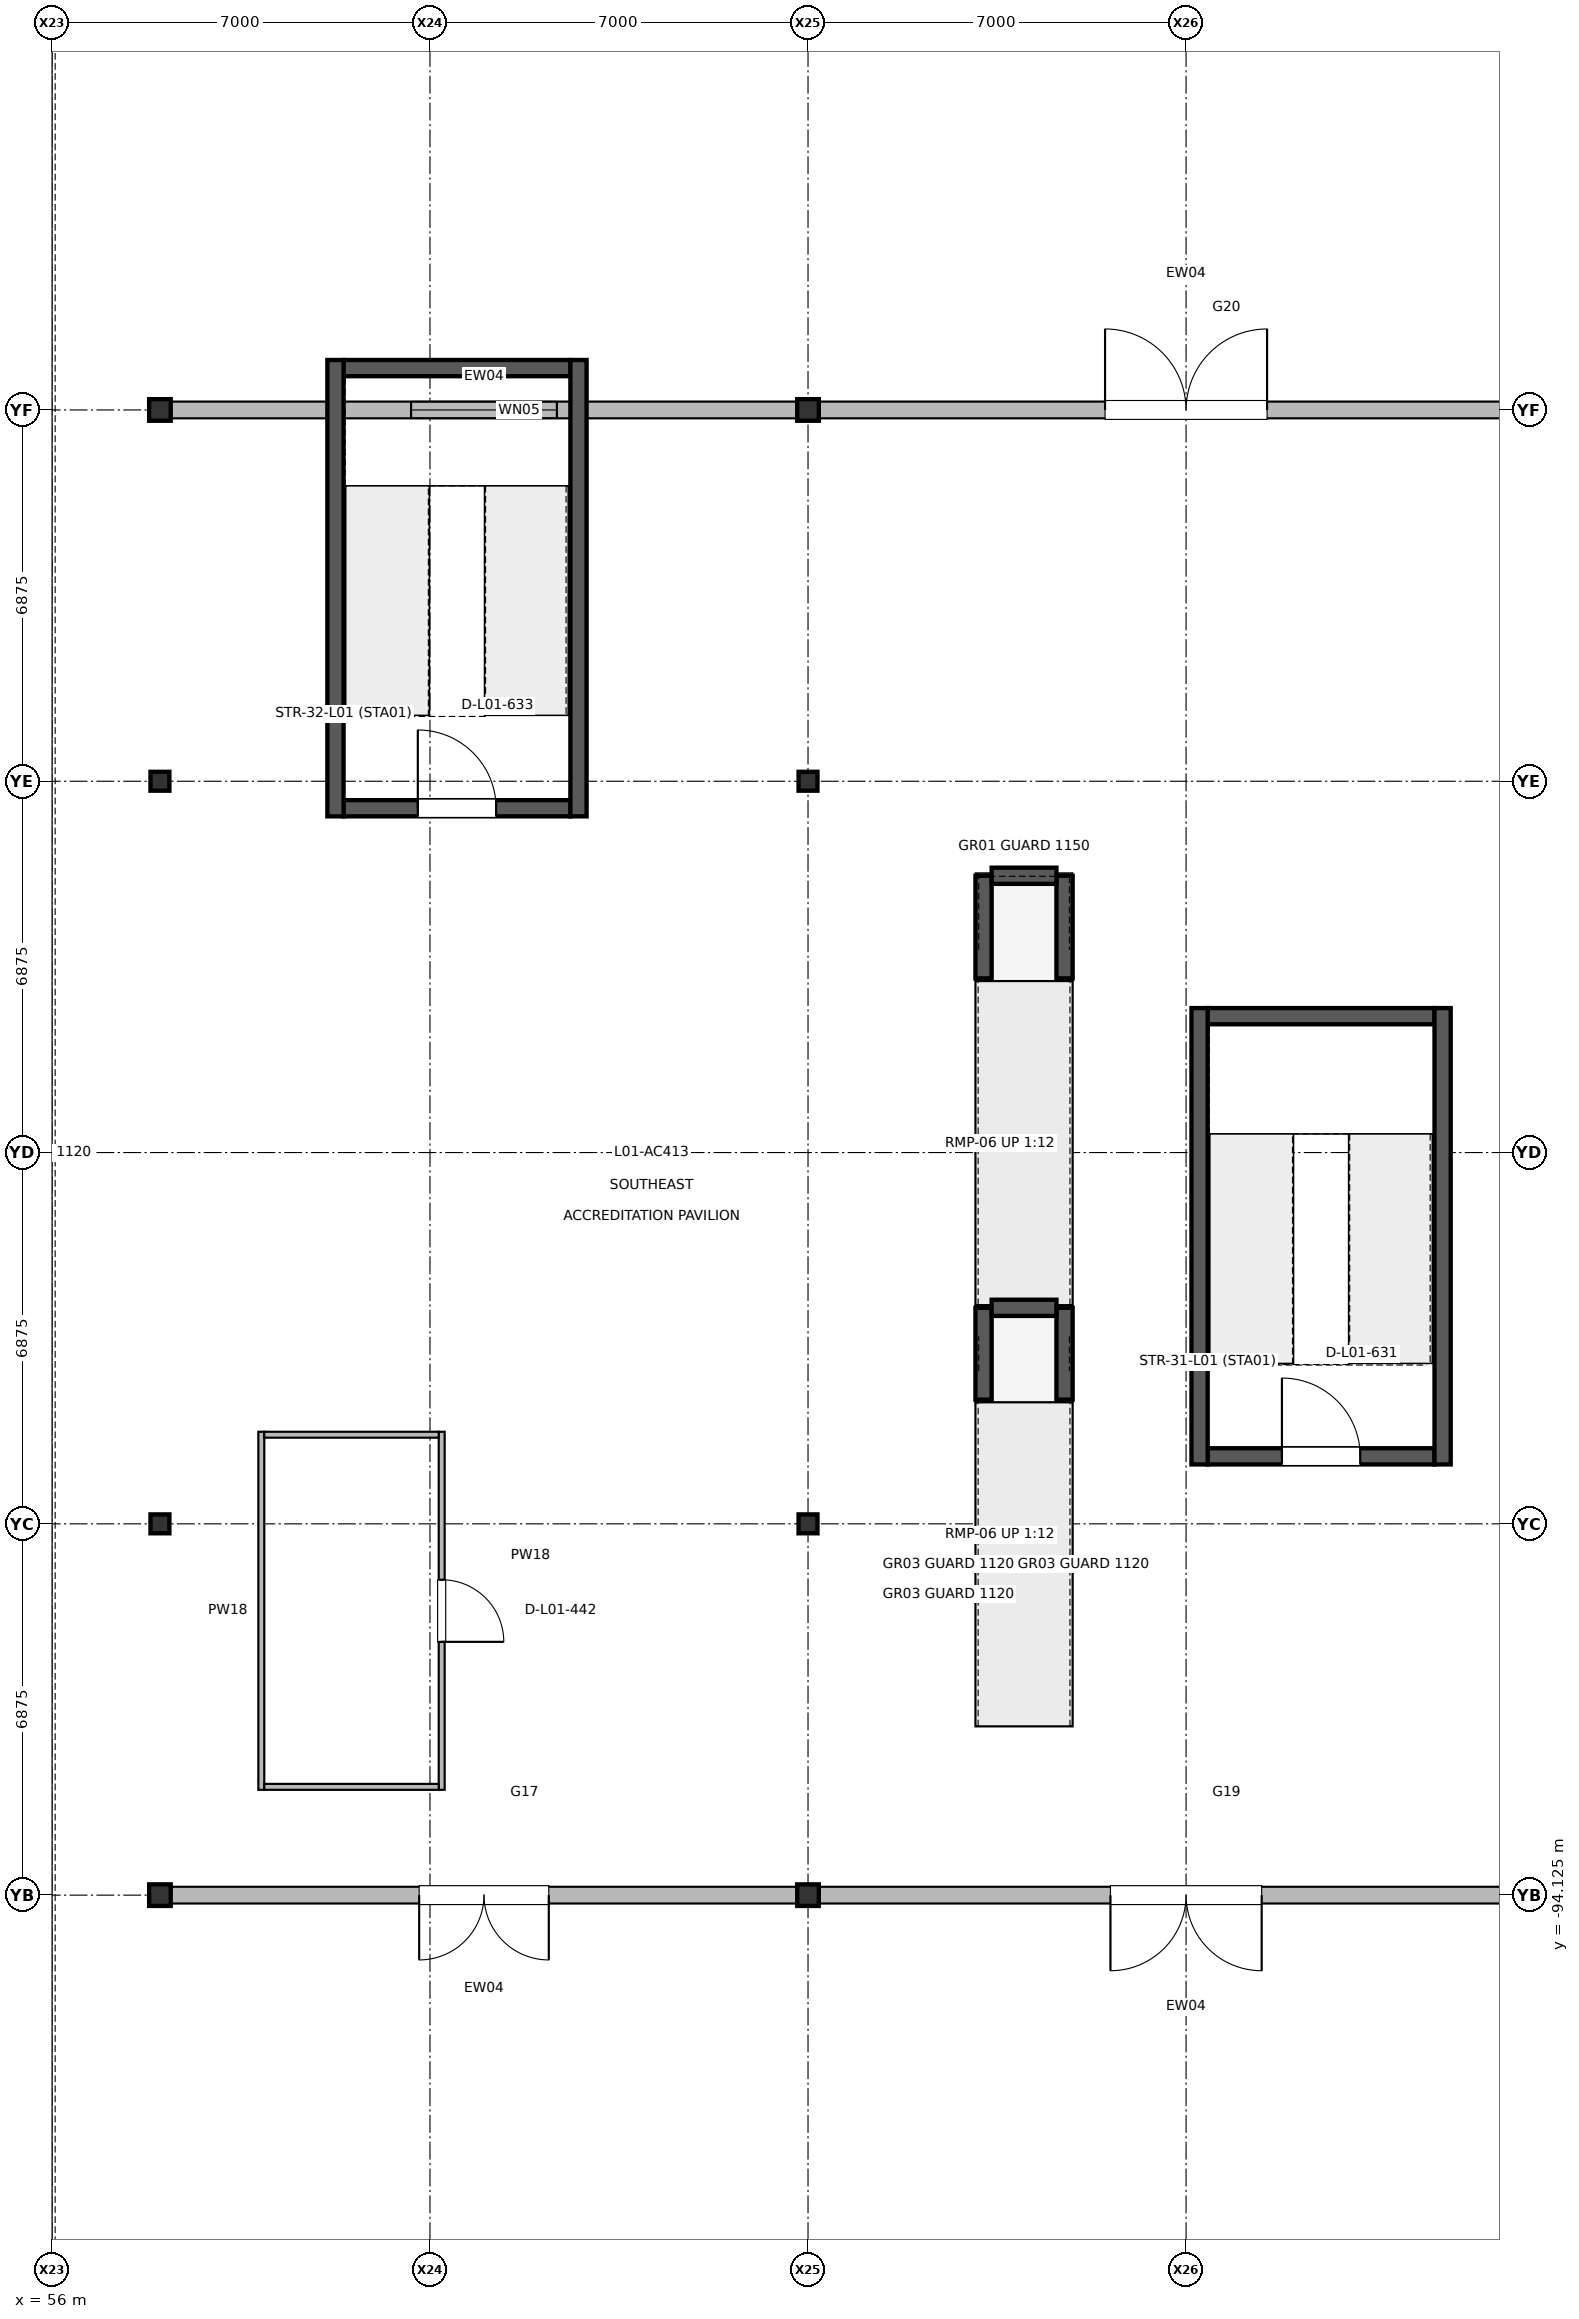
"""IFC4 building model, lengths in metres.
Left out: names, types, materials, properties, quantities, classifications, styles, units other than length and angle.
Written with IfcOpenShell. Run it as: python <this file> out.ifc"""

import sys

from ifc_helpers import new_model, si_unit, direction, frame, frame_2d, origin, origin_2d, place, context, subcontext, project, spatial, rectangle, i_section, extrude, element, fill, save


model = new_model("IFC4")
c1 = context("Model", 3, precision=1e-05, world=origin(), true_north=direction((0.0, 1.0)))
c2 = subcontext(c1, "Body", "Model", "MODEL_VIEW")
j1 = project(units=[si_unit("LENGTHUNIT", "METRE"), si_unit("PLANEANGLEUNIT", "RADIAN")], contexts=[c1])
p1 = place(None, origin())
s1 = spatial("IfcSite", under=j1, at=p1, CompositionType="ELEMENT")
p2 = place(p1, origin())
s2 = spatial("IfcBuilding", under=s1, at=p2, CompositionType="ELEMENT")
p3 = place(p2, origin())
s3 = spatial("IfcBuildingStorey", under=s2, at=p3, CompositionType="ELEMENT", Elevation=0.0)
p4 = place(p3, frame((58.0, -94.125, 0.0), z_axis=(0.0, 0.0, 1.0), x_axis=(1.0, 0.0, 0.0)))
e1 = element("IfcColumn", 1, at=p4, inside=s3, PredefinedType="COLUMN", context=c2, shape_type="SweptSolid", body=[
    extrude(i_section(OverallWidth=0.4, OverallDepth=0.4, WebThickness=0.013, FlangeThickness=0.021, at=origin_2d()), origin(), (0.0, 0.0, 1.0), 5.998),
])
for number, where, z_axis, x_axis in (
    (2, (58.0, -87.25, 0.0), (0.0, 0.0, 1.0), (1.0, 0.0, 0.0)),
    (3, (58.0, -73.5, 0.0), (0.0, 0.0, 1.0), (1.0, 0.0, 0.0)),
):
    element("IfcColumn", number, at=place(p3, frame(where, z_axis=z_axis, x_axis=x_axis)), inside=s3, PredefinedType="COLUMN", context=c2, shape_type="SweptSolid", body=[
        extrude(i_section(OverallWidth=0.35, OverallDepth=0.35, WebThickness=0.012, FlangeThickness=0.019, at=origin_2d()), origin(), (0.0, 0.0, 1.0), 5.998),
    ])
for number, where, z_axis, x_axis in (
    (4, (58.0, -66.625, 0.0), (0.0, 0.0, 1.0), (1.0, 0.0, 0.0)),
    (5, (70.0, -94.125, 0.0), (0.0, 0.0, 1.0), (1.0, 0.0, 0.0)),
):
    element("IfcColumn", number, at=place(p3, frame(where, z_axis=z_axis, x_axis=x_axis)), inside=s3, PredefinedType="COLUMN", context=c2, shape_type="SweptSolid", body=[
        extrude(i_section(OverallWidth=0.4, OverallDepth=0.4, WebThickness=0.013, FlangeThickness=0.021, at=origin_2d()), origin(), (0.0, 0.0, 1.0), 5.998),
    ])
for number, where, z_axis, x_axis in (
    (6, (70.0, -87.25, 0.0), (0.0, 0.0, 1.0), (1.0, 0.0, 0.0)),
    (7, (70.0, -73.5, 0.0), (0.0, 0.0, 1.0), (1.0, 0.0, 0.0)),
):
    element("IfcColumn", number, at=place(p3, frame(where, z_axis=z_axis, x_axis=x_axis)), inside=s3, PredefinedType="COLUMN", context=c2, shape_type="SweptSolid", body=[
        extrude(i_section(OverallWidth=0.35, OverallDepth=0.35, WebThickness=0.012, FlangeThickness=0.019, at=origin_2d()), origin(), (0.0, 0.0, 1.0), 5.998),
    ])
p5 = place(p3, frame((70.0, -66.625, 0.0), z_axis=(0.0, 0.0, 1.0), x_axis=(1.0, 0.0, 0.0)))
e8 = element("IfcColumn", 8, at=p5, inside=s3, PredefinedType="COLUMN", context=c2, shape_type="SweptSolid", body=[
    extrude(i_section(OverallWidth=0.4, OverallDepth=0.4, WebThickness=0.013, FlangeThickness=0.021, at=origin_2d()), origin(), (0.0, 0.0, 1.0), 5.998),
])
p6 = place(p3, frame((69.81, -94.125, 0.0), z_axis=(0.0, 0.0, 1.0), x_axis=(-1.0, 0.0, 0.0)))
e9 = element("IfcWall", 9, at=p6, inside=s3, PredefinedType="SOLIDWALL", context=c2, shape_type="SweptSolid", body=[
    extrude(rectangle(XDim=11.62, YDim=0.31, at=frame_2d((5.81, 0.0))), origin(), (0.0, 0.0, 1.0), 4.575),
])
p7 = place(p6, frame((4.61, 0.0, 0.0)))
e10 = element("IfcOpeningElement", 10, at=p7, cuts=e9, PredefinedType="OPENING", context=c2, shape_type="SweptSolid", body=[
    extrude(rectangle(XDim=2.4, YDim=2.5, at=frame_2d((1.2, 1.25))), frame((0.0, 0.165, 0.0), z_axis=(0.0, -1.0, 0.0), x_axis=(1.0, 0.0, 0.0)), (0.0, 0.0, 1.0), 0.33),
])
p8 = place(p3, frame((58.19, -66.625, 0.0), z_axis=(0.0, 0.0, 1.0), x_axis=(1.0, 0.0, 0.0)))
e11 = element("IfcWall", 11, at=p8, inside=s3, PredefinedType="SOLIDWALL", context=c2, shape_type="SweptSolid", body=[
    extrude(rectangle(XDim=11.62, YDim=0.31, at=frame_2d((5.81, 0.0))), origin(), (0.0, 0.0, 1.0), 4.675),
])
p9 = place(p8, frame((4.46, 0.0, 1.0)))
e12 = element("IfcOpeningElement", 12, at=p9, cuts=e11, PredefinedType="OPENING", context=c2, shape_type="SweptSolid", body=[
    extrude(rectangle(XDim=2.7, YDim=2.1, at=frame_2d((1.35, 1.05))), frame((0.0, 0.165, 0.0), z_axis=(0.0, -1.0, 0.0), x_axis=(1.0, 0.0, 0.0)), (0.0, 0.0, 1.0), 0.33),
])
p10 = place(p3, frame((83.81, -94.125, 0.0), z_axis=(0.0, 0.0, 1.0), x_axis=(-1.0, 0.0, 0.0)))
e13 = element("IfcWall", 13, at=p10, inside=s3, PredefinedType="SOLIDWALL", context=c2, shape_type="SweptSolid", body=[
    extrude(rectangle(XDim=13.62, YDim=0.31, at=frame_2d((6.81, 0.0))), origin(), (0.0, 0.0, 1.0), 4.175),
])
p11 = place(p10, frame((5.41, 0.0, 0.0)))
e14 = element("IfcOpeningElement", 14, at=p11, cuts=e13, PredefinedType="OPENING", context=c2, shape_type="SweptSolid", body=[
    extrude(rectangle(XDim=2.8, YDim=2.6, at=frame_2d((1.4, 1.3))), frame((0.0, 0.165, 0.0), z_axis=(0.0, -1.0, 0.0), x_axis=(1.0, 0.0, 0.0)), (0.0, 0.0, 1.0), 0.33),
])
p12 = place(p3, frame((70.19, -66.625, 0.0), z_axis=(0.0, 0.0, 1.0), x_axis=(1.0, 0.0, 0.0)))
e15 = element("IfcWall", 15, at=p12, inside=s3, PredefinedType="SOLIDWALL", context=c2, shape_type="SweptSolid", body=[
    extrude(rectangle(XDim=13.62, YDim=0.31, at=frame_2d((6.81, 0.0))), origin(), (0.0, 0.0, 1.0), 3.975),
])
p13 = place(p12, frame((5.31, 0.0, 0.0)))
e16 = element("IfcOpeningElement", 16, at=p13, cuts=e15, PredefinedType="OPENING", context=c2, shape_type="SweptSolid", body=[
    extrude(rectangle(XDim=3.0, YDim=2.65, at=frame_2d((1.5, 1.325))), frame((0.0, 0.165, 0.0), z_axis=(0.0, -1.0, 0.0), x_axis=(1.0, 0.0, 0.0)), (0.0, 0.0, 1.0), 0.33),
])
p14 = place(p3, frame((63.217, -85.545, 0.0), z_axis=(0.0, 0.0, 1.0), x_axis=(0.0, -1.0, 0.0)))
e17 = element("IfcWall", 17, at=p14, inside=s3, PredefinedType="PARTITIONING", context=c2, shape_type="SweptSolid", body=[
    extrude(rectangle(XDim=6.63, YDim=0.11, at=frame_2d((3.315, 0.0))), origin(), (0.0, 0.0, 1.0), 5.02),
])
p15 = place(p14, frame((2.74, 0.0, 0.0)))
e18 = element("IfcOpeningElement", 18, at=p15, cuts=e17, PredefinedType="OPENING", context=c2, shape_type="SweptSolid", body=[
    extrude(rectangle(XDim=1.15, YDim=2.2, at=frame_2d((0.575, 1.1))), frame((0.0, 0.065, 0.0), z_axis=(0.0, -1.0, 0.0), x_axis=(1.0, 0.0, 0.0)), (0.0, 0.0, 1.0), 0.13),
])
p16 = place(p3, frame((59.877, -92.175, 0.0), z_axis=(0.0, 0.0, 1.0), x_axis=(0.0, 1.0, 0.0)))
e19 = element("IfcWall", 19, at=p16, inside=s3, PredefinedType="PARTITIONING", context=c2, shape_type="SweptSolid", body=[
    extrude(rectangle(XDim=6.63, YDim=0.11, at=frame_2d((3.315, 0.0))), origin(), (0.0, 0.0, 1.0), 5.02),
])
for number, where, z_axis, x_axis in (
    (20, (59.932, -92.12, 0.0), (0.0, 0.0, 1.0), (1.0, 0.0, 0.0)),
    (21, (59.932, -85.6, 0.0), (0.0, 0.0, 1.0), (1.0, 0.0, 0.0)),
):
    element("IfcWall", number, at=place(p3, frame(where, z_axis=z_axis, x_axis=x_axis)), inside=s3, PredefinedType="PARTITIONING", context=c2, shape_type="SweptSolid", body=[
        extrude(rectangle(XDim=3.23, YDim=0.11, at=frame_2d((1.615, 0.0))), origin(), (0.0, 0.0, 1.0), 5.02),
    ])
p17 = place(p3, frame((77.4, -86.0, 0.0), z_axis=(0.0, 0.0, 1.0), x_axis=(1.0, 0.0, 0.0)))
e22 = element("IfcWall", 22, at=p17, inside=s3, PredefinedType="SHEAR", context=c2, shape_type="SweptSolid", body=[
    extrude(rectangle(XDim=4.2, YDim=0.3, at=frame_2d((2.1, 0.0))), origin(), (0.0, 0.0, 1.0), 5.8),
])
p18 = place(p17, frame((1.375, 0.0, 0.0)))
e23 = element("IfcOpeningElement", 23, at=p18, cuts=e22, PredefinedType="OPENING", context=c2, shape_type="SweptSolid", body=[
    extrude(rectangle(XDim=1.45, YDim=2.2, at=frame_2d((0.725, 1.1))), frame((0.0, 0.16, 0.0), z_axis=(0.0, -1.0, 0.0), x_axis=(1.0, 0.0, 0.0)), (0.0, 0.0, 1.0), 0.32),
])
p19 = place(p3, frame((77.4, -77.85, 0.0), z_axis=(0.0, 0.0, 1.0), x_axis=(1.0, 0.0, 0.0)))
e24 = element("IfcWall", 24, at=p19, inside=s3, PredefinedType="SHEAR", context=c2, shape_type="SweptSolid", body=[
    extrude(rectangle(XDim=4.2, YDim=0.3, at=frame_2d((2.1, 0.0))), origin(), (0.0, 0.0, 1.0), 5.8),
])
for number, where, z_axis, x_axis in (
    (25, (77.25, -86.15, 0.0), (0.0, 0.0, 1.0), (0.0, 1.0, 0.0)),
    (26, (81.75, -86.15, 0.0), (0.0, 0.0, 1.0), (0.0, 1.0, 0.0)),
):
    element("IfcWall", number, at=place(p3, frame(where, z_axis=z_axis, x_axis=x_axis)), inside=s3, PredefinedType="SHEAR", context=c2, shape_type="SweptSolid", body=[
        extrude(rectangle(XDim=8.45, YDim=0.3, at=frame_2d((4.225, 0.0))), origin(), (0.0, 0.0, 1.0), 5.8),
    ])
p20 = place(p3, frame((61.4, -74.0, 0.0), z_axis=(0.0, 0.0, 1.0), x_axis=(1.0, 0.0, 0.0)))
e27 = element("IfcWall", 27, at=p20, inside=s3, PredefinedType="SHEAR", context=c2, shape_type="SweptSolid", body=[
    extrude(rectangle(XDim=4.2, YDim=0.3, at=frame_2d((2.1, 0.0))), origin(), (0.0, 0.0, 1.0), 5.8),
])
p21 = place(p20, frame((1.375, 0.0, 0.0)))
e28 = element("IfcOpeningElement", 28, at=p21, cuts=e27, PredefinedType="OPENING", context=c2, shape_type="SweptSolid", body=[
    extrude(rectangle(XDim=1.45, YDim=2.2, at=frame_2d((0.725, 1.1))), frame((0.0, 0.16, 0.0), z_axis=(0.0, -1.0, 0.0), x_axis=(1.0, 0.0, 0.0)), (0.0, 0.0, 1.0), 0.32),
])
p22 = place(p3, frame((61.4, -65.85, 0.0), z_axis=(0.0, 0.0, 1.0), x_axis=(1.0, 0.0, 0.0)))
e29 = element("IfcWall", 29, at=p22, inside=s3, PredefinedType="SHEAR", context=c2, shape_type="SweptSolid", body=[
    extrude(rectangle(XDim=4.2, YDim=0.3, at=frame_2d((2.1, 0.0))), origin(), (0.0, 0.0, 1.0), 5.8),
])
for number, where, z_axis, x_axis in (
    (30, (61.25, -74.15, 0.0), (0.0, 0.0, 1.0), (0.0, 1.0, 0.0)),
    (31, (65.75, -74.15, 0.0), (0.0, 0.0, 1.0), (0.0, 1.0, 0.0)),
):
    element("IfcWall", number, at=place(p3, frame(where, z_axis=z_axis, x_axis=x_axis)), inside=s3, PredefinedType="SHEAR", context=c2, shape_type="SweptSolid", body=[
        extrude(rectangle(XDim=8.45, YDim=0.3, at=frame_2d((4.225, 0.0))), origin(), (0.0, 0.0, 1.0), 5.8),
    ])
for number, where, z_axis, x_axis in (
    (32, (73.25, -84.95, 0.0), (0.0, 0.0, 1.0), (0.0, 1.0, 0.0)),
    (33, (74.75, -84.95, 0.0), (0.0, 0.0, 1.0), (0.0, 1.0, 0.0)),
):
    element("IfcWall", number, at=place(p3, frame(where, z_axis=z_axis, x_axis=x_axis)), inside=s3, PredefinedType="SHEAR", context=c2, shape_type="SweptSolid", body=[
        extrude(rectangle(XDim=1.7, YDim=0.3, at=frame_2d((0.85, 0.0))), origin(), (0.0, 0.0, 1.0), 0.3),
    ])
p23 = place(p3, frame((73.4, -83.25, 0.0), z_axis=(0.0, 0.0, 1.0), x_axis=(1.0, 0.0, 0.0)))
e34 = element("IfcWall", 34, at=p23, inside=s3, PredefinedType="SHEAR", context=c2, shape_type="SweptSolid", body=[
    extrude(rectangle(XDim=1.2, YDim=0.3, at=frame_2d((0.6, 0.0))), origin(), (0.0, 0.0, 1.0), 0.3),
])
for number, where, z_axis, x_axis in (
    (35, (73.25, -77.15, 0.0), (0.0, 0.0, 1.0), (0.0, 1.0, 0.0)),
    (36, (74.75, -77.15, 0.0), (0.0, 0.0, 1.0), (0.0, 1.0, 0.0)),
):
    element("IfcWall", number, at=place(p3, frame(where, z_axis=z_axis, x_axis=x_axis)), inside=s3, PredefinedType="SHEAR", context=c2, shape_type="SweptSolid", body=[
        extrude(rectangle(XDim=1.9, YDim=0.3, at=frame_2d((0.95, 0.0))), origin(), (0.0, 0.0, 1.0), 0.8),
    ])
p24 = place(p3, frame((73.4, -75.25, 0.0), z_axis=(0.0, 0.0, 1.0), x_axis=(1.0, 0.0, 0.0)))
e37 = element("IfcWall", 37, at=p24, inside=s3, PredefinedType="SHEAR", context=c2, shape_type="SweptSolid", body=[
    extrude(rectangle(XDim=1.2, YDim=0.3, at=frame_2d((0.6, 0.0))), origin(), (0.0, 0.0, 1.0), 0.8),
])
p25 = place(p7, origin())
e38 = element("IfcDoor", 38, at=p25, inside=s3, OperationType="DOUBLE_DOOR_SINGLE_SWING", PredefinedType="DOOR", context=c2, shape_type="SweptSolid", body=[
    extrude(rectangle(XDim=2.4, YDim=2.5, at=frame_2d((1.2, 1.25))), frame((0.0, 0.025, 0.0), z_axis=(0.0, -1.0, 0.0), x_axis=(1.0, 0.0, 0.0)), (0.0, 0.0, 1.0), 0.05),
])
fill(e10, e38)
p26 = place(p9, origin())
e39 = element("IfcWindow", 39, at=p26, inside=s3, PartitioningType="SINGLE_PANEL", PredefinedType="WINDOW", context=c2, shape_type="SweptSolid", body=[
    extrude(rectangle(XDim=2.7, YDim=2.1, at=frame_2d((1.35, 1.05))), frame((0.0, 0.03, 0.0), z_axis=(0.0, -1.0, 0.0), x_axis=(1.0, 0.0, 0.0)), (0.0, 0.0, 1.0), 0.06),
])
fill(e12, e39)
p27 = place(p11, origin())
e40 = element("IfcDoor", 40, at=p27, inside=s3, OperationType="DOUBLE_DOOR_SINGLE_SWING", PredefinedType="DOOR", context=c2, shape_type="SweptSolid", body=[
    extrude(rectangle(XDim=2.8, YDim=2.6, at=frame_2d((1.4, 1.3))), frame((0.0, 0.025, 0.0), z_axis=(0.0, -1.0, 0.0), x_axis=(1.0, 0.0, 0.0)), (0.0, 0.0, 1.0), 0.05),
])
fill(e14, e40)
p28 = place(p13, origin())
e41 = element("IfcDoor", 41, at=p28, inside=s3, OperationType="DOUBLE_DOOR_SINGLE_SWING", PredefinedType="DOOR", context=c2, shape_type="SweptSolid", body=[
    extrude(rectangle(XDim=3.0, YDim=2.65, at=frame_2d((1.5, 1.325))), frame((0.0, 0.025, 0.0), z_axis=(0.0, -1.0, 0.0), x_axis=(1.0, 0.0, 0.0)), (0.0, 0.0, 1.0), 0.05),
])
fill(e16, e41)
p29 = place(p15, origin())
e42 = element("IfcDoor", 42, at=p29, inside=s3, OperationType="SINGLE_SWING_RIGHT", PredefinedType="DOOR", context=c2, shape_type="SweptSolid", body=[
    extrude(rectangle(XDim=1.15, YDim=2.2, at=frame_2d((0.575, 1.1))), frame((0.0, 0.025, 0.0), z_axis=(0.0, -1.0, 0.0), x_axis=(1.0, 0.0, 0.0)), (0.0, 0.0, 1.0), 0.05),
])
fill(e18, e42)
p30 = place(p18, origin())
e43 = element("IfcDoor", 43, at=p30, inside=s3, OperationType="SINGLE_SWING_LEFT", PredefinedType="DOOR", context=c2, shape_type="SweptSolid", body=[
    extrude(rectangle(XDim=1.45, YDim=2.2, at=frame_2d((0.725, 1.1))), frame((0.0, 0.025, 0.0), z_axis=(0.0, -1.0, 0.0), x_axis=(1.0, 0.0, 0.0)), (0.0, 0.0, 1.0), 0.05),
])
fill(e23, e43)
p31 = place(p21, origin())
e44 = element("IfcDoor", 44, at=p31, inside=s3, OperationType="SINGLE_SWING_LEFT", PredefinedType="DOOR", context=c2, shape_type="SweptSolid", body=[
    extrude(rectangle(XDim=1.45, YDim=2.2, at=frame_2d((0.725, 1.1))), frame((0.0, 0.025, 0.0), z_axis=(0.0, -1.0, 0.0), x_axis=(1.0, 0.0, 0.0)), (0.0, 0.0, 1.0), 0.05),
])
fill(e28, e44)
save(model, sys.argv[1])
